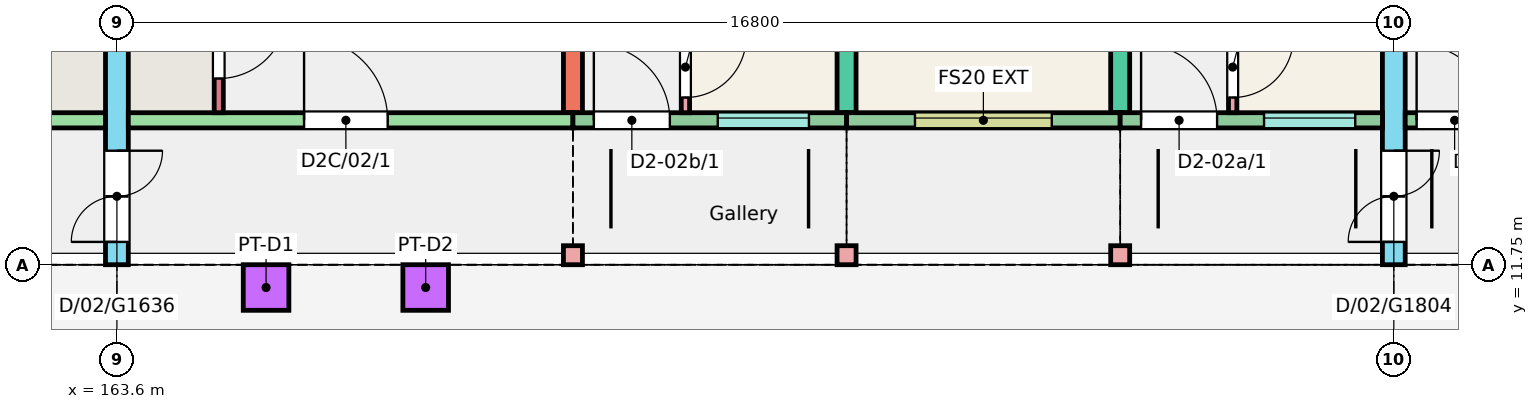
"""IFC4 building model, lengths in metres.
Left out: names, types, materials, properties, quantities, classifications, styles, units other than length and angle.
Written with IfcOpenShell. Run it as: python <this file> out.ifc"""

import sys

from ifc_helpers import new_model, si_unit, direction, frame, frame_2d, origin, origin_2d, place, context, subcontext, project, spatial, rectangle, extrude, element, fill, save


model = new_model("IFC4")
c1 = context("Model", 3, precision=1e-05, world=origin(), true_north=direction((0.0, 1.0)))
c2 = subcontext(c1, "Body", "Model", "MODEL_VIEW")
j1 = project(units=[si_unit("LENGTHUNIT", "METRE"), si_unit("PLANEANGLEUNIT", "RADIAN")], contexts=[c1])
p1 = place(None, origin())
s1 = spatial("IfcSite", under=j1, at=p1, CompositionType="ELEMENT")
p2 = place(p1, origin())
s2 = spatial("IfcBuilding", under=s1, at=p2, CompositionType="ELEMENT")
p3 = place(p2, frame((0.0, 0.0, 6.0)))
s3 = spatial("IfcBuildingStorey", under=s2, at=p3, CompositionType="ELEMENT", Elevation=6.0)
p4 = place(p3, frame((163.6, 11.75, 0.0), z_axis=(0.0, 0.0, 1.0), x_axis=(0.0, 1.0, 0.0)))
e1 = element("IfcWall", 1, at=p4, inside=s3, PredefinedType="SHEAR", context=c2, shape_type="SweptSolid", body=[
    extrude(rectangle(XDim=11.0, YDim=0.3, at=frame_2d((5.5, 0.0))), origin(), (0.0, 0.0, 1.0), 3.0),
])
p5 = place(p4, frame((0.3, 0.0, 0.0)))
e2 = element("IfcOpeningElement", 2, at=p5, cuts=e1, PredefinedType="OPENING", context=c2, shape_type="SweptSolid", body=[
    extrude(rectangle(XDim=1.2, YDim=2.1, at=frame_2d((0.6, 1.05))), frame((0.0, 0.16, 0.0), z_axis=(0.0, -1.0, 0.0), x_axis=(1.0, 0.0, 0.0)), (0.0, 0.0, 1.0), 0.32),
])
for number, where, z_axis, x_axis in (
    (3, (169.6, 13.75, 0.0), (0.0, 0.0, 1.0), (0.0, 1.0, 0.0)),
    (4, (173.2, 13.75, 0.0), (0.0, 0.0, 1.0), (0.0, 1.0, 0.0)),
):
    element("IfcWall", number, at=place(p3, frame(where, z_axis=z_axis, x_axis=x_axis)), inside=s3, PredefinedType="SHEAR", context=c2, shape_type="SweptSolid", body=[
        extrude(rectangle(XDim=9.0, YDim=0.25, at=frame_2d((4.5, 0.0))), origin(), (0.0, 0.0, 1.0), 3.0),
    ])
p6 = place(p3, frame((176.8, 13.75, 0.0), z_axis=(0.0, 0.0, 1.0), x_axis=(0.0, 1.0, 0.0)))
e5 = element("IfcWall", 5, at=p6, inside=s3, PredefinedType="SHEAR", context=c2, shape_type="SweptSolid", body=[
    extrude(rectangle(XDim=9.0, YDim=0.25, at=frame_2d((4.5, 0.0))), origin(), (0.0, 0.0, 1.0), 3.0),
])
p7 = place(p6, frame((2.4, 0.0, 0.0)))
e6 = element("IfcOpeningElement", 6, at=p7, cuts=e5, PredefinedType="OPENING", context=c2, shape_type="SweptSolid", body=[
    extrude(rectangle(XDim=1.2, YDim=2.1, at=frame_2d((0.6, 1.05))), frame((0.0, 0.135, 0.0), z_axis=(0.0, -1.0, 0.0), x_axis=(1.0, 0.0, 0.0)), (0.0, 0.0, 1.0), 0.27),
])
p8 = place(p6, frame((6.4, 0.0, 0.0)))
e7 = element("IfcOpeningElement", 7, at=p8, cuts=e5, PredefinedType="OPENING", context=c2, shape_type="SweptSolid", body=[
    extrude(rectangle(XDim=1.2, YDim=2.1, at=frame_2d((0.6, 1.05))), frame((0.0, 0.135, 0.0), z_axis=(0.0, -1.0, 0.0), x_axis=(1.0, 0.0, 0.0)), (0.0, 0.0, 1.0), 0.27),
])
p9 = place(p3, frame((180.4, 11.75, 0.0), z_axis=(0.0, 0.0, 1.0), x_axis=(0.0, 1.0, 0.0)))
e8 = element("IfcWall", 8, at=p9, inside=s3, PredefinedType="SHEAR", context=c2, shape_type="SweptSolid", body=[
    extrude(rectangle(XDim=11.0, YDim=0.3, at=frame_2d((5.5, 0.0))), origin(), (0.0, 0.0, 1.0), 3.0),
])
p10 = place(p9, frame((0.3, 0.0, 0.0)))
e9 = element("IfcOpeningElement", 9, at=p10, cuts=e8, PredefinedType="OPENING", context=c2, shape_type="SweptSolid", body=[
    extrude(rectangle(XDim=1.2, YDim=2.1, at=frame_2d((0.6, 1.05))), frame((0.0, 0.16, 0.0), z_axis=(0.0, -1.0, 0.0), x_axis=(1.0, 0.0, 0.0)), (0.0, 0.0, 1.0), 0.32),
])
p11 = place(p3, frame((157.6, 13.65, 0.0), z_axis=(0.0, 0.0, 1.0), x_axis=(1.0, 0.0, 0.0)))
e10 = element("IfcWall", 10, at=p11, inside=s3, PredefinedType="SHEAR", context=c2, shape_type="SweptSolid", body=[
    extrude(rectangle(XDim=5.85, YDim=0.2, at=frame_2d((2.925, 0.0))), origin(), (0.0, 0.0, 1.0), 3.0),
])
p12 = place(p11, frame((2.438, 0.0, 0.0)))
e11 = element("IfcOpeningElement", 11, at=p12, cuts=e10, PredefinedType="OPENING", context=c2, shape_type="SweptSolid", body=[
    extrude(rectangle(XDim=1.1, YDim=2.1, at=frame_2d((0.55, 1.05))), frame((0.0, 0.11, 0.0), z_axis=(0.0, -1.0, 0.0), x_axis=(1.0, 0.0, 0.0)), (0.0, 0.0, 1.0), 0.22),
])
p13 = place(p3, frame((163.75, 13.65, 0.0), z_axis=(0.0, 0.0, 1.0), x_axis=(1.0, 0.0, 0.0)))
e12 = element("IfcWall", 12, at=p13, inside=s3, PredefinedType="SHEAR", context=c2, shape_type="SweptSolid", body=[
    extrude(rectangle(XDim=5.85, YDim=0.2, at=frame_2d((2.925, 0.0))), origin(), (0.0, 0.0, 1.0), 3.0),
])
p14 = place(p13, frame((2.312, 0.0, 0.0)))
e13 = element("IfcOpeningElement", 13, at=p14, cuts=e12, PredefinedType="OPENING", context=c2, shape_type="SweptSolid", body=[
    extrude(rectangle(XDim=1.1, YDim=2.1, at=frame_2d((0.55, 1.05))), frame((0.0, 0.11, 0.0), z_axis=(0.0, -1.0, 0.0), x_axis=(1.0, 0.0, 0.0)), (0.0, 0.0, 1.0), 0.22),
])
p15 = place(p3, frame((164.94, 13.75, 0.0), z_axis=(0.0, 0.0, 1.0), x_axis=(0.0, 1.0, 0.0)))
e14 = element("IfcWall", 14, at=p15, inside=s3, PredefinedType="SHEAR", context=c2, shape_type="SweptSolid", body=[
    extrude(rectangle(XDim=1.72, YDim=0.12, at=frame_2d((0.86, 0.0))), origin(), (0.0, 0.0, 1.0), 3.0),
])
p16 = place(p15, frame((0.45, 0.0, 0.0)))
e15 = element("IfcOpeningElement", 15, at=p16, cuts=e14, PredefinedType="OPENING", context=c2, shape_type="SweptSolid", body=[
    extrude(rectangle(XDim=0.9, YDim=2.1, at=frame_2d((0.45, 1.05))), frame((0.0, 0.07, 0.0), z_axis=(0.0, -1.0, 0.0), x_axis=(1.0, 0.0, 0.0)), (0.0, 0.0, 1.0), 0.14),
])
p17 = place(p3, frame((169.6, 13.65, 0.0), z_axis=(0.0, 0.0, 1.0), x_axis=(1.0, 0.0, 0.0)))
e16 = element("IfcWall", 16, at=p17, inside=s3, PredefinedType="SOLIDWALL", context=c2, shape_type="SweptSolid", body=[
    extrude(rectangle(XDim=3.6, YDim=0.2, at=frame_2d((1.8, 0.0))), origin(), (0.0, 0.0, 1.0), 3.0),
])
p18 = place(p17, frame((1.905, 0.0, 1.1)))
e17 = element("IfcOpeningElement", 17, at=p18, cuts=e16, PredefinedType="OPENING", context=c2, shape_type="SweptSolid", body=[
    extrude(rectangle(XDim=1.2, YDim=1.3, at=frame_2d((0.6, 0.65))), frame((0.0, 0.11, 0.0), z_axis=(0.0, -1.0, 0.0), x_axis=(1.0, 0.0, 0.0)), (0.0, 0.0, 1.0), 0.22),
])
p19 = place(p17, frame((0.275, 0.0, 0.0)))
e18 = element("IfcOpeningElement", 18, at=p19, cuts=e16, PredefinedType="OPENING", context=c2, shape_type="SweptSolid", body=[
    extrude(rectangle(XDim=1.0, YDim=2.1, at=frame_2d((0.5, 1.05))), frame((0.0, 0.11, 0.0), z_axis=(0.0, -1.0, 0.0), x_axis=(1.0, 0.0, 0.0)), (0.0, 0.0, 1.0), 0.22),
])
p20 = place(p3, frame((173.2, 13.65, 0.0), z_axis=(0.0, 0.0, 1.0), x_axis=(1.0, 0.0, 0.0)))
e19 = element("IfcWall", 19, at=p20, inside=s3, PredefinedType="SOLIDWALL", context=c2, shape_type="SweptSolid", body=[
    extrude(rectangle(XDim=3.6, YDim=0.2, at=frame_2d((1.8, 0.0))), origin(), (0.0, 0.0, 1.0), 3.0),
])
p21 = place(p20, frame((0.9, 0.0, 1.1)))
e20 = element("IfcOpeningElement", 20, at=p21, cuts=e19, PredefinedType="OPENING", context=c2, shape_type="SweptSolid", body=[
    extrude(rectangle(XDim=1.8, YDim=1.3, at=frame_2d((0.9, 0.65))), frame((0.0, 0.11, 0.0), z_axis=(0.0, -1.0, 0.0), x_axis=(1.0, 0.0, 0.0)), (0.0, 0.0, 1.0), 0.22),
])
p22 = place(p3, frame((176.8, 13.65, 0.0), z_axis=(0.0, 0.0, 1.0), x_axis=(1.0, 0.0, 0.0)))
e21 = element("IfcWall", 21, at=p22, inside=s3, PredefinedType="SOLIDWALL", context=c2, shape_type="SweptSolid", body=[
    extrude(rectangle(XDim=3.45, YDim=0.2, at=frame_2d((1.725, 0.0))), origin(), (0.0, 0.0, 1.0), 3.0),
])
p23 = place(p22, frame((1.893, 0.0, 1.1)))
e22 = element("IfcOpeningElement", 22, at=p23, cuts=e21, PredefinedType="OPENING", context=c2, shape_type="SweptSolid", body=[
    extrude(rectangle(XDim=1.2, YDim=1.3, at=frame_2d((0.6, 0.65))), frame((0.0, 0.11, 0.0), z_axis=(0.0, -1.0, 0.0), x_axis=(1.0, 0.0, 0.0)), (0.0, 0.0, 1.0), 0.22),
])
p24 = place(p22, frame((0.275, 0.0, 0.0)))
e23 = element("IfcOpeningElement", 23, at=p24, cuts=e21, PredefinedType="OPENING", context=c2, shape_type="SweptSolid", body=[
    extrude(rectangle(XDim=1.0, YDim=2.1, at=frame_2d((0.5, 1.05))), frame((0.0, 0.11, 0.0), z_axis=(0.0, -1.0, 0.0), x_axis=(1.0, 0.0, 0.0)), (0.0, 0.0, 1.0), 0.22),
])
p25 = place(p3, frame((180.55, 13.65, 0.0), z_axis=(0.0, 0.0, 1.0), x_axis=(1.0, 0.0, 0.0)))
e24 = element("IfcWall", 24, at=p25, inside=s3, PredefinedType="SOLIDWALL", context=c2, shape_type="SweptSolid", body=[
    extrude(rectangle(XDim=3.45, YDim=0.2, at=frame_2d((1.725, 0.0))), origin(), (0.0, 0.0, 1.0), 3.0),
])
p26 = place(p25, frame((1.768, 0.0, 1.1)))
e25 = element("IfcOpeningElement", 25, at=p26, cuts=e24, PredefinedType="OPENING", context=c2, shape_type="SweptSolid", body=[
    extrude(rectangle(XDim=1.2, YDim=1.3, at=frame_2d((0.6, 0.65))), frame((0.0, 0.11, 0.0), z_axis=(0.0, -1.0, 0.0), x_axis=(1.0, 0.0, 0.0)), (0.0, 0.0, 1.0), 0.22),
])
p27 = place(p25, frame((0.15, 0.0, 0.0)))
e26 = element("IfcOpeningElement", 26, at=p27, cuts=e24, PredefinedType="OPENING", context=c2, shape_type="SweptSolid", body=[
    extrude(rectangle(XDim=1.0, YDim=2.1, at=frame_2d((0.5, 1.05))), frame((0.0, 0.11, 0.0), z_axis=(0.0, -1.0, 0.0), x_axis=(1.0, 0.0, 0.0)), (0.0, 0.0, 1.0), 0.22),
])
for number, where, z_axis, x_axis in (
    (27, (169.6, 11.875, 0.0), (0.0, 0.0, 1.0), (1.0, 0.0, 0.0)),
    (28, (173.2, 11.875, 0.0), (0.0, 0.0, 1.0), (1.0, 0.0, 0.0)),
    (29, (176.8, 11.875, 0.0), (0.0, 0.0, 1.0), (1.0, 0.0, 0.0)),
):
    element("IfcColumn", number, at=place(p3, frame(where, z_axis=z_axis, x_axis=x_axis)), inside=s3, PredefinedType="COLUMN", context=c2, shape_type="SweptSolid", body=[
        extrude(rectangle(XDim=0.25, YDim=0.25, at=origin_2d()), origin(), (0.0, 0.0, 1.0), 3.0),
    ])
for number, where, z_axis, x_axis in (
    (30, (165.562, 11.45, 0.3), (0.0, 0.0, 1.0), (1.0, 0.0, 0.0)),
    (31, (167.663, 11.45, 0.3), (0.0, 0.0, 1.0), (1.0, 0.0, 0.0)),
):
    element("IfcColumn", number, at=place(p3, frame(where, z_axis=z_axis, x_axis=x_axis)), inside=s3, PredefinedType="COLUMN", context=c2, shape_type="SweptSolid", body=[
        extrude(rectangle(XDim=0.6, YDim=0.6, at=origin_2d()), origin(), (0.0, 0.0, 1.0), 2.6),
    ])
p28 = place(p3, frame((178.28, 13.75, 0.0), z_axis=(0.0, 0.0, 1.0), x_axis=(0.0, 1.0, 0.0)))
e32 = element("IfcWall", 32, at=p28, inside=s3, PredefinedType="PARTITIONING", context=c2, shape_type="SweptSolid", body=[
    extrude(rectangle(XDim=4.3, YDim=0.11, at=frame_2d((2.15, 0.0))), origin(), (0.0, 0.0, 1.0), 2.8),
])
p29 = place(p28, frame((0.2, 0.0, 0.0)))
e33 = element("IfcOpeningElement", 33, at=p29, cuts=e32, PredefinedType="OPENING", context=c2, shape_type="SweptSolid", body=[
    extrude(rectangle(XDim=0.8, YDim=2.1, at=frame_2d((0.4, 1.05))), frame((0.0, 0.065, 0.0), z_axis=(0.0, -1.0, 0.0), x_axis=(1.0, 0.0, 0.0)), (0.0, 0.0, 1.0), 0.13),
])
p30 = place(p28, frame((3.35, 0.0, 0.0)))
e34 = element("IfcOpeningElement", 34, at=p30, cuts=e32, PredefinedType="OPENING", context=c2, shape_type="SweptSolid", body=[
    extrude(rectangle(XDim=0.8, YDim=2.1, at=frame_2d((0.4, 1.05))), frame((0.0, 0.065, 0.0), z_axis=(0.0, -1.0, 0.0), x_axis=(1.0, 0.0, 0.0)), (0.0, 0.0, 1.0), 0.13),
])
p31 = place(p3, frame((171.08, 13.75, 0.0), z_axis=(0.0, 0.0, 1.0), x_axis=(0.0, 1.0, 0.0)))
e35 = element("IfcWall", 35, at=p31, inside=s3, PredefinedType="PARTITIONING", context=c2, shape_type="SweptSolid", body=[
    extrude(rectangle(XDim=4.3, YDim=0.11, at=frame_2d((2.15, 0.0))), origin(), (0.0, 0.0, 1.0), 2.8),
])
p32 = place(p31, frame((0.2, 0.0, 0.0)))
e36 = element("IfcOpeningElement", 36, at=p32, cuts=e35, PredefinedType="OPENING", context=c2, shape_type="SweptSolid", body=[
    extrude(rectangle(XDim=0.8, YDim=2.1, at=frame_2d((0.4, 1.05))), frame((0.0, 0.065, 0.0), z_axis=(0.0, -1.0, 0.0), x_axis=(1.0, 0.0, 0.0)), (0.0, 0.0, 1.0), 0.13),
])
p33 = place(p31, frame((3.35, 0.0, 0.0)))
e37 = element("IfcOpeningElement", 37, at=p33, cuts=e35, PredefinedType="OPENING", context=c2, shape_type="SweptSolid", body=[
    extrude(rectangle(XDim=0.8, YDim=2.1, at=frame_2d((0.4, 1.05))), frame((0.0, 0.065, 0.0), z_axis=(0.0, -1.0, 0.0), x_axis=(1.0, 0.0, 0.0)), (0.0, 0.0, 1.0), 0.13),
])
p34 = place(p21, origin())
e38 = element("IfcWindow", 38, at=p34, inside=s3, PartitioningType="SINGLE_PANEL", PredefinedType="WINDOW", context=c2, shape_type="SweptSolid", body=[
    extrude(rectangle(XDim=1.8, YDim=1.3, at=frame_2d((0.9, 0.65))), frame((0.0, 0.06, 0.0), z_axis=(0.0, -1.0, 0.0), x_axis=(1.0, 0.0, 0.0)), (0.0, 0.0, 1.0), 0.06),
])
fill(e20, e38)
p35 = place(p23, origin())
e39 = element("IfcWindow", 39, at=p35, inside=s3, PartitioningType="SINGLE_PANEL", PredefinedType="WINDOW", context=c2, shape_type="SweptSolid", body=[
    extrude(rectangle(XDim=1.2, YDim=1.3, at=frame_2d((0.6, 0.65))), frame((0.0, 0.06, 0.0), z_axis=(0.0, -1.0, 0.0), x_axis=(1.0, 0.0, 0.0)), (0.0, 0.0, 1.0), 0.06),
])
fill(e22, e39)
p36 = place(p18, origin())
e40 = element("IfcWindow", 40, at=p36, inside=s3, PartitioningType="SINGLE_PANEL", PredefinedType="WINDOW", context=c2, shape_type="SweptSolid", body=[
    extrude(rectangle(XDim=1.2, YDim=1.3, at=frame_2d((0.6, 0.65))), frame((0.0, 0.06, 0.0), z_axis=(0.0, -1.0, 0.0), x_axis=(1.0, 0.0, 0.0)), (0.0, 0.0, 1.0), 0.06),
])
fill(e17, e40)
p37 = place(p24, origin())
e41 = element("IfcDoor", 41, at=p37, inside=s3, OperationType="SINGLE_SWING_LEFT", PredefinedType="DOOR", context=c2, shape_type="SweptSolid", body=[
    extrude(rectangle(XDim=1.0, YDim=2.1, at=frame_2d((0.5, 1.05))), frame((0.0, 0.025, 0.0), z_axis=(0.0, -1.0, 0.0), x_axis=(1.0, 0.0, 0.0)), (0.0, 0.0, 1.0), 0.05),
])
fill(e23, e41)
p38 = place(p29, origin())
e42 = element("IfcDoor", 42, at=p38, inside=s3, OperationType="SINGLE_SWING_RIGHT", PredefinedType="DOOR", context=c2, shape_type="SweptSolid", body=[
    extrude(rectangle(XDim=0.8, YDim=2.1, at=frame_2d((0.4, 1.05))), frame((0.0, 0.025, 0.0), z_axis=(0.0, -1.0, 0.0), x_axis=(1.0, 0.0, 0.0)), (0.0, 0.0, 1.0), 0.05),
])
fill(e33, e42)
p39 = place(p19, origin())
e43 = element("IfcDoor", 43, at=p39, inside=s3, OperationType="SINGLE_SWING_LEFT", PredefinedType="DOOR", context=c2, shape_type="SweptSolid", body=[
    extrude(rectangle(XDim=1.0, YDim=2.1, at=frame_2d((0.5, 1.05))), frame((0.0, 0.025, 0.0), z_axis=(0.0, -1.0, 0.0), x_axis=(1.0, 0.0, 0.0)), (0.0, 0.0, 1.0), 0.05),
])
fill(e18, e43)
p40 = place(p32, origin())
e44 = element("IfcDoor", 44, at=p40, inside=s3, OperationType="SINGLE_SWING_RIGHT", PredefinedType="DOOR", context=c2, shape_type="SweptSolid", body=[
    extrude(rectangle(XDim=0.8, YDim=2.1, at=frame_2d((0.4, 1.05))), frame((0.0, 0.025, 0.0), z_axis=(0.0, -1.0, 0.0), x_axis=(1.0, 0.0, 0.0)), (0.0, 0.0, 1.0), 0.05),
])
fill(e36, e44)
p41 = place(p27, origin())
e45 = element("IfcDoor", 45, at=p41, inside=s3, OperationType="SINGLE_SWING_LEFT", PredefinedType="DOOR", context=c2, shape_type="SweptSolid", body=[
    extrude(rectangle(XDim=1.0, YDim=2.1, at=frame_2d((0.5, 1.05))), frame((0.0, 0.025, 0.0), z_axis=(0.0, -1.0, 0.0), x_axis=(1.0, 0.0, 0.0)), (0.0, 0.0, 1.0), 0.05),
])
fill(e26, e45)
p42 = place(p14, origin())
e46 = element("IfcDoor", 46, at=p42, inside=s3, OperationType="SINGLE_SWING_LEFT", PredefinedType="DOOR", context=c2, shape_type="SweptSolid", body=[
    extrude(rectangle(XDim=1.1, YDim=2.1, at=frame_2d((0.55, 1.05))), frame((0.0, 0.025, 0.0), z_axis=(0.0, -1.0, 0.0), x_axis=(1.0, 0.0, 0.0)), (0.0, 0.0, 1.0), 0.05),
])
fill(e13, e46)
p43 = place(p16, origin())
e47 = element("IfcDoor", 47, at=p43, inside=s3, OperationType="SINGLE_SWING_RIGHT", PredefinedType="DOOR", context=c2, shape_type="SweptSolid", body=[
    extrude(rectangle(XDim=0.9, YDim=2.1, at=frame_2d((0.45, 1.05))), frame((0.0, 0.025, 0.0), z_axis=(0.0, -1.0, 0.0), x_axis=(1.0, 0.0, 0.0)), (0.0, 0.0, 1.0), 0.05),
])
fill(e15, e47)
p44 = place(p5, origin())
e48 = element("IfcDoor", 48, at=p44, inside=s3, OperationType="DOUBLE_DOOR_SINGLE_SWING", PredefinedType="DOOR", context=c2, shape_type="SweptSolid", body=[
    extrude(rectangle(XDim=1.2, YDim=2.1, at=frame_2d((0.6, 1.05))), frame((0.0, 0.025, 0.0), z_axis=(0.0, -1.0, 0.0), x_axis=(1.0, 0.0, 0.0)), (0.0, 0.0, 1.0), 0.05),
])
fill(e2, e48)
p45 = place(p10, origin())
e49 = element("IfcDoor", 49, at=p45, inside=s3, OperationType="DOUBLE_DOOR_SINGLE_SWING", PredefinedType="DOOR", context=c2, shape_type="SweptSolid", body=[
    extrude(rectangle(XDim=1.2, YDim=2.1, at=frame_2d((0.6, 1.05))), frame((0.0, 0.025, 0.0), z_axis=(0.0, -1.0, 0.0), x_axis=(1.0, 0.0, 0.0)), (0.0, 0.0, 1.0), 0.05),
])
fill(e9, e49)
save(model, sys.argv[1])
